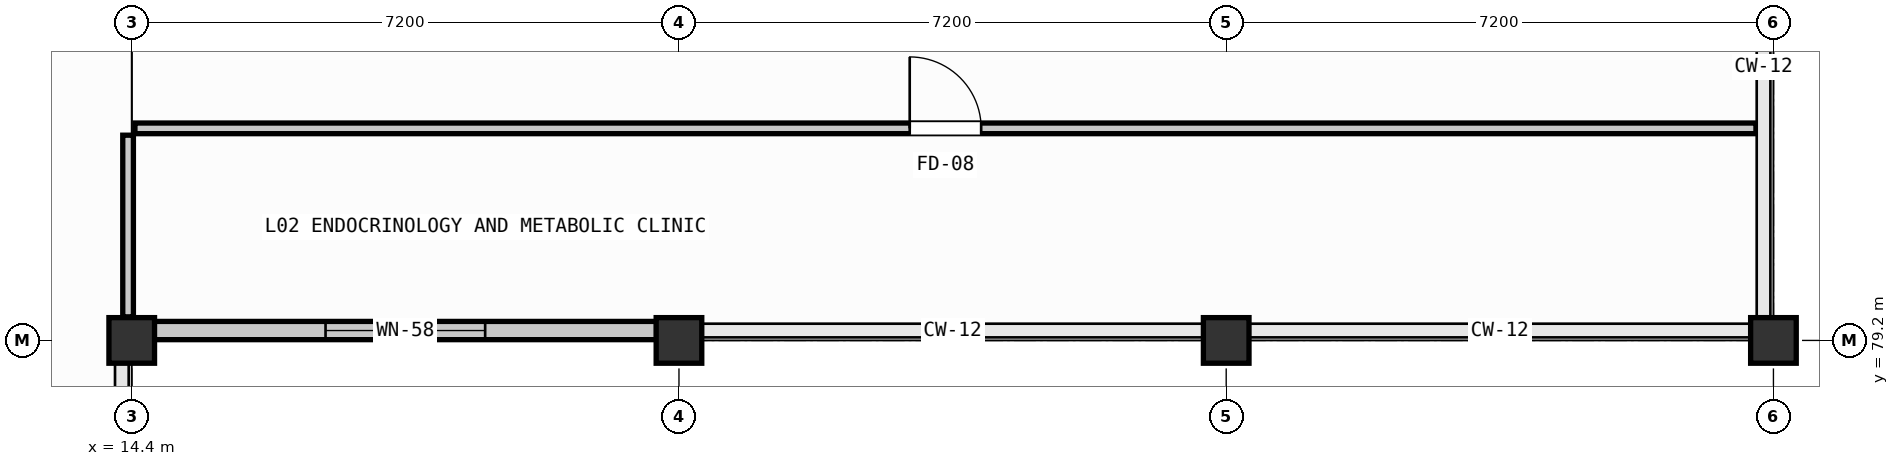
"""IFC4 building model, lengths in metres.
Left out: names, types, materials, properties, quantities, classifications, styles, units other than length and angle.
Written with IfcOpenShell. Run it as: python <this file> out.ifc"""

import sys

from ifc_helpers import new_model, si_unit, direction, frame, frame_2d, origin, origin_2d, place, context, subcontext, project, spatial, rectangle, extrude, element, fill, save


model = new_model("IFC4")
c1 = context("Model", 3, precision=1e-05, world=origin(), true_north=direction((0.0, 1.0)))
c2 = subcontext(c1, "Body", "Model", "MODEL_VIEW")
j1 = project(units=[si_unit("LENGTHUNIT", "METRE"), si_unit("PLANEANGLEUNIT", "RADIAN")], contexts=[c1])
p1 = place(None, origin())
s1 = spatial("IfcSite", under=j1, at=p1, CompositionType="ELEMENT")
p2 = place(p1, origin())
s2 = spatial("IfcBuilding", under=s1, at=p2, CompositionType="ELEMENT")
p3 = place(p2, frame((0.0, 0.0, 4.8)))
s3 = spatial("IfcBuildingStorey", under=s2, at=p3, CompositionType="ELEMENT", Elevation=4.8)
for number, where, z_axis, x_axis in (
    (1, (14.4, 79.2, 0.0), (0.0, 0.0, 1.0), (1.0, 0.0, 0.0)),
    (2, (21.6, 79.2, 0.0), (0.0, 0.0, 1.0), (1.0, 0.0, 0.0)),
    (3, (28.8, 79.2, 0.0), (0.0, 0.0, 1.0), (1.0, 0.0, 0.0)),
    (4, (36.0, 79.2, 0.0), (0.0, 0.0, 1.0), (1.0, 0.0, 0.0)),
):
    element("IfcColumn", number, at=place(p3, frame(where, z_axis=z_axis, x_axis=x_axis)), inside=s3, PredefinedType="COLUMN", context=c2, shape_type="SweptSolid", body=[
        extrude(rectangle(XDim=0.6, YDim=0.6, at=origin_2d()), origin(), (0.0, 0.0, 1.0), 4.2),
    ])
p4 = place(p3, frame((21.305, 79.33, 0.0), z_axis=(0.0, 0.0, 1.0), x_axis=(-1.0, 0.0, 0.0)))
e5 = element("IfcWall", 5, at=p4, inside=s3, PredefinedType="SOLIDWALL", context=c2, shape_type="SweptSolid", body=[
    extrude(rectangle(XDim=6.61, YDim=0.24, at=frame_2d((3.305, 0.0))), origin(), (0.0, 0.0, 1.0), 3.4),
])
p5 = place(p4, frame((2.255, 0.0, 0.95)))
e6 = element("IfcOpeningElement", 6, at=p5, cuts=e5, PredefinedType="OPENING", context=c2, shape_type="SweptSolid", body=[
    extrude(rectangle(XDim=2.1, YDim=1.85, at=frame_2d((1.05, 0.925))), frame((0.0, 0.13, 0.0), z_axis=(0.0, -1.0, 0.0), x_axis=(1.0, 0.0, 0.0)), (0.0, 0.0, 1.0), 0.26),
])
p6 = place(p3, frame((14.352, 79.51, 0.0), z_axis=(0.0, 0.0, 1.0), x_axis=(0.0, 1.0, 0.0)))
e7 = element("IfcWall", 7, at=p6, inside=s3, PredefinedType="PARTITIONING", context=c2, shape_type="SweptSolid", body=[
    extrude(rectangle(XDim=2.39, YDim=0.14, at=frame_2d((1.195, 0.0))), origin(), (0.0, 0.0, 1.0), 3.4),
])
p7 = place(p3, frame((14.442, 81.99, 0.0), z_axis=(0.0, 0.0, 1.0), x_axis=(1.0, 0.0, 0.0)))
e8 = element("IfcWall", 8, at=p7, inside=s3, PredefinedType="PARTITIONING", context=c2, shape_type="SweptSolid", body=[
    extrude(rectangle(XDim=21.328, YDim=0.14, at=frame_2d((10.664, 0.0))), origin(), (0.0, 0.0, 1.0), 3.5),
])
p8 = place(p7, frame((10.194, 0.0, 0.0)))
e9 = element("IfcOpeningElement", 9, at=p8, cuts=e8, PredefinedType="OPENING", context=c2, shape_type="SweptSolid", body=[
    extrude(rectangle(XDim=0.94, YDim=2.1, at=frame_2d((0.47, 1.05))), frame((0.0, 0.08, 0.0), z_axis=(0.0, -1.0, 0.0), x_axis=(1.0, 0.0, 0.0)), (0.0, 0.0, 1.0), 0.16),
])
p9 = place(p5, origin())
e10 = element("IfcWindow", 10, at=p9, inside=s3, PartitioningType="SINGLE_PANEL", PredefinedType="WINDOW", context=c2, shape_type="SweptSolid", body=[
    extrude(rectangle(XDim=2.1, YDim=1.85, at=frame_2d((1.05, 0.925))), frame((0.0, 0.03, 0.0), z_axis=(0.0, -1.0, 0.0), x_axis=(1.0, 0.0, 0.0)), (0.0, 0.0, 1.0), 0.06),
])
fill(e6, e10)
p10 = place(p8, origin())
e11 = element("IfcDoor", 11, at=p10, inside=s3, OperationType="SINGLE_SWING_RIGHT", PredefinedType="DOOR", context=c2, shape_type="SweptSolid", body=[
    extrude(rectangle(XDim=0.94, YDim=2.1, at=frame_2d((0.47, 1.05))), frame((0.0, 0.025, 0.0), z_axis=(0.0, -1.0, 0.0), x_axis=(1.0, 0.0, 0.0)), (0.0, 0.0, 1.0), 0.05),
])
fill(e9, e11)
save(model, sys.argv[1])
